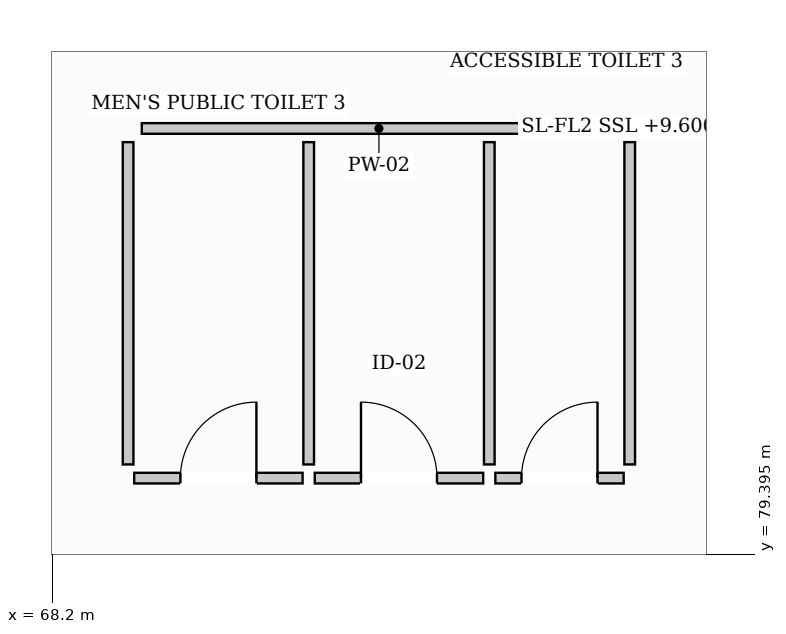
"""IFC4 building model, lengths in metres.
Left out: names, types, materials, properties, quantities, classifications, styles, units other than length and angle.
Written with IfcOpenShell. Run it as: python <this file> out.ifc"""

import sys

from ifc_helpers import new_model, si_unit, direction, frame, frame_2d, origin, place, context, subcontext, project, spatial, rectangle, extrude, element, fill, save


model = new_model("IFC4")
c1 = context("Model", 3, precision=1e-05, world=origin(), true_north=direction((0.0, 1.0)))
c2 = subcontext(c1, "Body", "Model", "MODEL_VIEW")
j1 = project(units=[si_unit("LENGTHUNIT", "METRE"), si_unit("PLANEANGLEUNIT", "RADIAN")], contexts=[c1])
p1 = place(None, origin())
s1 = spatial("IfcSite", under=j1, at=p1, CompositionType="ELEMENT")
p2 = place(p1, origin())
s2 = spatial("IfcBuilding", under=s1, at=p2, CompositionType="ELEMENT")
p3 = place(p2, frame((0.0, 0.0, 9.6)))
s3 = spatial("IfcBuildingStorey", under=s2, at=p3, CompositionType="ELEMENT", Elevation=9.6)
p4 = place(p3, frame((69.38, 85.0, 0.0), z_axis=(0.0, 0.0, 1.0), x_axis=(1.0, 0.0, 0.0)))
e1 = element("IfcWall", 1, at=p4, inside=s3, PredefinedType="PARTITIONING", context=c2, shape_type="SweptSolid", body=[
    extrude(rectangle(XDim=6.24, YDim=0.14, at=frame_2d((3.12, 0.0))), origin(), (0.0, 0.0, 1.0), 3.06),
])
for number, where, z_axis, x_axis in (
    (2, (69.2, 80.58, 0.0), (0.0, 0.0, 1.0), (0.0, 1.0, 0.0)),
    (3, (75.8, 80.58, 0.0), (0.0, 0.0, 1.0), (0.0, 1.0, 0.0)),
    (4, (71.576, 80.58, 0.0), (0.0, 0.0, 1.0), (0.0, 1.0, 0.0)),
    (5, (73.952, 80.58, 0.0), (0.0, 0.0, 1.0), (0.0, 1.0, 0.0)),
):
    element("IfcWall", number, at=place(p3, frame(where, z_axis=z_axis, x_axis=x_axis)), inside=s3, PredefinedType="PARTITIONING", context=c2, shape_type="SweptSolid", body=[
        extrude(rectangle(XDim=4.24, YDim=0.14, at=frame_2d((2.12, 0.0))), origin(), (0.0, 0.0, 1.0), 3.28),
    ])
p5 = place(p3, frame((69.28, 80.4, 0.0), z_axis=(0.0, 0.0, 1.0), x_axis=(1.0, 0.0, 0.0)))
e6 = element("IfcWall", 6, at=p5, inside=s3, PredefinedType="PARTITIONING", context=c2, shape_type="SweptSolid", body=[
    extrude(rectangle(XDim=2.216, YDim=0.14, at=frame_2d((1.108, 0.0))), origin(), (0.0, 0.0, 1.0), 3.28),
])
p6 = place(p5, frame((0.608, 0.0, 0.0)))
e7 = element("IfcOpeningElement", 7, at=p6, cuts=e6, PredefinedType="OPENING", context=c2, shape_type="SweptSolid", body=[
    extrude(rectangle(XDim=1.0, YDim=2.15, at=frame_2d((0.5, 1.075))), frame((0.0, 0.08, 0.0), z_axis=(0.0, -1.0, 0.0), x_axis=(1.0, 0.0, 0.0)), (0.0, 0.0, 1.0), 0.16),
])
p7 = place(p3, frame((71.656, 80.4, 0.0), z_axis=(0.0, 0.0, 1.0), x_axis=(1.0, 0.0, 0.0)))
e8 = element("IfcWall", 8, at=p7, inside=s3, PredefinedType="PARTITIONING", context=c2, shape_type="SweptSolid", body=[
    extrude(rectangle(XDim=2.216, YDim=0.14, at=frame_2d((1.108, 0.0))), origin(), (0.0, 0.0, 1.0), 3.06),
])
p8 = place(p7, frame((0.608, 0.0, 0.0)))
e9 = element("IfcOpeningElement", 9, at=p8, cuts=e8, PredefinedType="OPENING", context=c2, shape_type="SweptSolid", body=[
    extrude(rectangle(XDim=1.0, YDim=2.15, at=frame_2d((0.5, 1.075))), frame((0.0, 0.08, 0.0), z_axis=(0.0, -1.0, 0.0), x_axis=(1.0, 0.0, 0.0)), (0.0, 0.0, 1.0), 0.16),
])
p9 = place(p3, frame((74.032, 80.4, 0.0), z_axis=(0.0, 0.0, 1.0), x_axis=(1.0, 0.0, 0.0)))
e10 = element("IfcWall", 10, at=p9, inside=s3, PredefinedType="PARTITIONING", context=c2, shape_type="SweptSolid", body=[
    extrude(rectangle(XDim=1.688, YDim=0.14, at=frame_2d((0.844, 0.0))), origin(), (0.0, 0.0, 1.0), 3.28),
])
p10 = place(p9, frame((0.344, 0.0, 0.0)))
e11 = element("IfcOpeningElement", 11, at=p10, cuts=e10, PredefinedType="OPENING", context=c2, shape_type="SweptSolid", body=[
    extrude(rectangle(XDim=1.0, YDim=2.15, at=frame_2d((0.5, 1.075))), frame((0.0, 0.08, 0.0), z_axis=(0.0, -1.0, 0.0), x_axis=(1.0, 0.0, 0.0)), (0.0, 0.0, 1.0), 0.16),
])
p11 = place(p6, origin())
e12 = element("IfcDoor", 12, at=p11, inside=s3, OperationType="SINGLE_SWING_RIGHT", PredefinedType="DOOR", context=c2, shape_type="SweptSolid", body=[
    extrude(rectangle(XDim=1.0, YDim=2.15, at=frame_2d((0.5, 1.075))), frame((0.0, 0.025, 0.0), z_axis=(0.0, -1.0, 0.0), x_axis=(1.0, 0.0, 0.0)), (0.0, 0.0, 1.0), 0.05),
])
fill(e7, e12)
p12 = place(p8, origin())
e13 = element("IfcDoor", 13, at=p12, inside=s3, OperationType="SINGLE_SWING_LEFT", PredefinedType="DOOR", context=c2, shape_type="SweptSolid", body=[
    extrude(rectangle(XDim=1.0, YDim=2.15, at=frame_2d((0.5, 1.075))), frame((0.0, 0.025, 0.0), z_axis=(0.0, -1.0, 0.0), x_axis=(1.0, 0.0, 0.0)), (0.0, 0.0, 1.0), 0.05),
])
fill(e9, e13)
p13 = place(p10, origin())
e14 = element("IfcDoor", 14, at=p13, inside=s3, OperationType="SINGLE_SWING_RIGHT", PredefinedType="DOOR", context=c2, shape_type="SweptSolid", body=[
    extrude(rectangle(XDim=1.0, YDim=2.15, at=frame_2d((0.5, 1.075))), frame((0.0, 0.025, 0.0), z_axis=(0.0, -1.0, 0.0), x_axis=(1.0, 0.0, 0.0)), (0.0, 0.0, 1.0), 0.05),
])
fill(e11, e14)
save(model, sys.argv[1])
